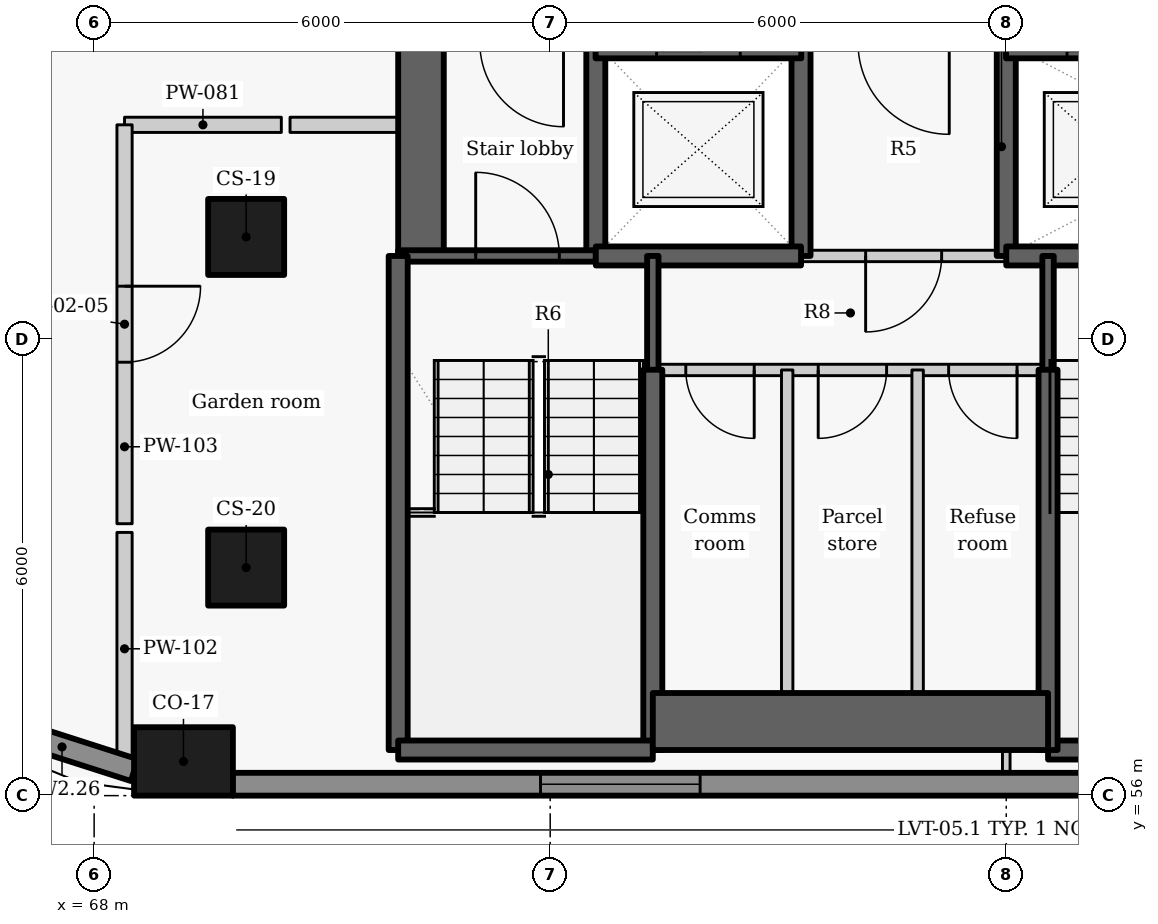
"""IFC4 building model, lengths in metres.
Left out: names, types, materials, properties, quantities, classifications, styles, units other than length and angle.
Written with IfcOpenShell. Run it as: python <this file> out.ifc"""

import sys

from ifc_helpers import new_model, si_unit, direction, frame, frame_2d, origin, origin_2d, place, context, subcontext, project, spatial, rectangle, extrude, element, fill, save


model = new_model("IFC4")
c1 = context("Model", 3, precision=1e-05, world=origin(), true_north=direction((0.0, 1.0)))
c2 = subcontext(c1, "Body", "Model", "MODEL_VIEW")
j1 = project(units=[si_unit("LENGTHUNIT", "METRE"), si_unit("PLANEANGLEUNIT", "RADIAN")], contexts=[c1])
p1 = place(None, origin())
s1 = spatial("IfcSite", under=j1, at=p1, CompositionType="ELEMENT")
p2 = place(p1, origin())
s2 = spatial("IfcBuilding", under=s1, at=p2, CompositionType="ELEMENT")
p3 = place(p2, frame((0.0, 0.0, 127.2)))
s3 = spatial("IfcBuildingStorey", under=s2, at=p3, CompositionType="ELEMENT", Elevation=127.2)
p4 = place(p3, frame((69.175, 56.45, 0.0), z_axis=(0.0, 0.0, 1.0), x_axis=(1.0, 0.0, 0.0)))
e1 = element("IfcColumn", 1, at=p4, inside=s3, PredefinedType="COLUMN", context=c2, shape_type="SweptSolid", body=[
    extrude(rectangle(XDim=1.3, YDim=0.9, at=origin_2d()), origin(), (0.0, 0.0, 1.0), 3.3),
])
for number, where, z_axis, x_axis in (
    (2, (70.0, 63.35, 0.0), (0.0, 0.0, 1.0), (0.0, -1.0, 0.0)),
    (3, (70.0, 59.0, 0.0), (0.0, 0.0, 1.0), (0.0, -1.0, 0.0)),
):
    element("IfcColumn", number, at=place(p3, frame(where, z_axis=z_axis, x_axis=x_axis)), inside=s3, PredefinedType="COLUMN", context=c2, shape_type="SweptSolid", body=[
        extrude(rectangle(XDim=1.0, YDim=1.0, at=origin_2d()), origin(), (0.0, 0.0, 1.0), 3.3),
    ])
p5 = place(p3, frame((66.626, 56.946, 0.0), z_axis=(0.0, 0.0, 1.0), x_axis=(0.952201240673, -0.305471434444, 0.0)))
e4 = element("IfcWall", 4, at=p5, inside=s3, PredefinedType="SOLIDWALL", context=c2, shape_type="SweptSolid", body=[
    extrude(rectangle(XDim=1.999, YDim=0.3, at=frame_2d((1.0, 0.0))), origin(), (0.0, 0.0, 1.0), 2.425),
])
p6 = place(p3, frame((69.821, 56.15, 0.0), z_axis=(0.0, 0.0, 1.0), x_axis=(1.0, 0.0, 0.0)))
e5 = element("IfcWall", 5, at=p6, inside=s3, PredefinedType="SOLIDWALL", context=c2, shape_type="SweptSolid", body=[
    extrude(rectangle(XDim=20.04, YDim=0.3, at=frame_2d((10.02, 0.0))), origin(), (0.0, 0.0, 1.0), 2.425),
])
p7 = place(p6, frame((4.051, 0.0, 0.9)))
e6 = element("IfcOpeningElement", 6, at=p7, cuts=e5, PredefinedType="OPENING", context=c2, shape_type="SweptSolid", body=[
    extrude(rectangle(XDim=2.1, YDim=1.1, at=frame_2d((1.05, 0.55))), frame((0.0, 0.16, 0.0), z_axis=(0.0, -1.0, 0.0), x_axis=(1.0, 0.0, 0.0)), (0.0, 0.0, 1.0), 0.32),
])
p8 = place(p6, frame((14.047, 0.0, 0.9)))
e7 = element("IfcOpeningElement", 7, at=p8, cuts=e5, PredefinedType="OPENING", context=c2, shape_type="SweptSolid", body=[
    extrude(rectangle(XDim=2.1, YDim=1.1, at=frame_2d((1.05, 0.55))), frame((0.0, 0.16, 0.0), z_axis=(0.0, -1.0, 0.0), x_axis=(1.0, 0.0, 0.0)), (0.0, 0.0, 1.0), 0.32),
])
p9 = place(p3, frame((74.6, 63.1, -0.41), z_axis=(0.0, 0.0, 1.0), x_axis=(0.0, 1.0, 0.0)))
e8 = element("IfcWall", 8, at=p9, inside=s3, PredefinedType="SHEAR", context=c2, shape_type="SweptSolid", body=[
    extrude(rectangle(XDim=2.8, YDim=0.25, at=frame_2d((1.4, 0.0))), origin(), (0.0, 0.0, 1.0), 3.435),
])
p10 = place(p3, frame((72.3, 63.1, -0.41), z_axis=(0.0, 0.0, 1.0), x_axis=(0.0, 1.0, 0.0)))
e9 = element("IfcWall", 9, at=p10, inside=s3, PredefinedType="SHEAR", context=c2, shape_type="SweptSolid", body=[
    extrude(rectangle(XDim=9.1, YDim=0.6, at=frame_2d((4.55, 0.0))), origin(), (0.0, 0.0, 1.0), 3.435),
])
p11 = place(p10, frame((3.748, 0.0, 0.41)))
e10 = element("IfcOpeningElement", 10, at=p11, cuts=e9, PredefinedType="OPENING", context=c2, shape_type="SweptSolid", body=[
    extrude(rectangle(XDim=1.5, YDim=2.1, at=frame_2d((0.75, 1.05))), frame((0.0, 0.31, 0.0), z_axis=(0.0, -1.0, 0.0), x_axis=(1.0, 0.0, 0.0)), (0.0, 0.0, 1.0), 0.62),
])
for number, where, z_axis, x_axis in (
    (11, (77.3, 63.1, -0.41), (0.0, 0.0, 1.0), (0.0, 1.0, 0.0)),
    (12, (80.0, 63.1, -0.41), (0.0, 0.0, 1.0), (0.0, 1.0, 0.0)),
):
    element("IfcWall", number, at=place(p3, frame(where, z_axis=z_axis, x_axis=x_axis)), inside=s3, PredefinedType="SHEAR", context=c2, shape_type="SweptSolid", body=[
        extrude(rectangle(XDim=2.8, YDim=0.25, at=frame_2d((1.4, 0.0))), origin(), (0.0, 0.0, 1.0), 3.435),
    ])
p12 = place(p3, frame((74.597, 65.9, -0.41), z_axis=(0.0, 0.0, 1.0), x_axis=(1.0, 0.0, 0.0)))
e13 = element("IfcWall", 13, at=p12, inside=s3, PredefinedType="SHEAR", context=c2, shape_type="SweptSolid", body=[
    extrude(rectangle(XDim=2.706, YDim=0.4, at=frame_2d((1.353, 0.0))), origin(), (0.0, 0.0, 1.0), 3.435),
])
p13 = place(p12, frame((0.803, 0.0, 0.41)))
e14 = element("IfcOpeningElement", 14, at=p13, cuts=e13, PredefinedType="OPENING", context=c2, shape_type="SweptSolid", body=[
    extrude(rectangle(XDim=1.1, YDim=2.1, at=frame_2d((0.55, 1.05))), frame((0.0, 0.21, 0.0), z_axis=(0.0, -1.0, 0.0), x_axis=(1.0, 0.0, 0.0)), (0.0, 0.0, 1.0), 0.42),
])
p14 = place(p3, frame((79.997, 65.9, -0.41), z_axis=(0.0, 0.0, 1.0), x_axis=(1.0, 0.0, 0.0)))
e15 = element("IfcWall", 15, at=p14, inside=s3, PredefinedType="SHEAR", context=c2, shape_type="SweptSolid", body=[
    extrude(rectangle(XDim=5.406, YDim=0.4, at=frame_2d((2.703, 0.0))), origin(), (0.0, 0.0, 1.0), 3.435),
])
p15 = place(p14, frame((0.803, 0.0, 0.41)))
e16 = element("IfcOpeningElement", 16, at=p15, cuts=e15, PredefinedType="OPENING", context=c2, shape_type="SweptSolid", body=[
    extrude(rectangle(XDim=1.1, YDim=2.1, at=frame_2d((0.55, 1.05))), frame((0.0, 0.21, 0.0), z_axis=(0.0, -1.0, 0.0), x_axis=(1.0, 0.0, 0.0)), (0.0, 0.0, 1.0), 0.42),
])
p16 = place(p3, frame((72.0, 63.1, -0.41), z_axis=(0.0, 0.0, 1.0), x_axis=(1.0, 0.0, 0.0)))
e17 = element("IfcWall", 17, at=p16, inside=s3, PredefinedType="SHEAR", context=c2, shape_type="SweptSolid", body=[
    extrude(rectangle(XDim=2.6, YDim=0.15, at=frame_2d((1.3, 0.0))), origin(), (0.0, 0.0, 1.0), 3.435),
])
p17 = place(p16, frame((1.02, 0.0, 0.41)))
e18 = element("IfcOpeningElement", 18, at=p17, cuts=e17, PredefinedType="OPENING", context=c2, shape_type="SweptSolid", body=[
    extrude(rectangle(XDim=1.1, YDim=2.1, at=frame_2d((0.55, 1.05))), frame((0.0, 0.085, 0.0), z_axis=(0.0, -1.0, 0.0), x_axis=(1.0, 0.0, 0.0)), (0.0, 0.0, 1.0), 0.17),
])
p18 = place(p3, frame((74.6, 63.1, -0.41), z_axis=(0.0, 0.0, 1.0), x_axis=(1.0, 0.0, 0.0)))
e19 = element("IfcWall", 19, at=p18, inside=s3, PredefinedType="SHEAR", context=c2, shape_type="SweptSolid", body=[
    extrude(rectangle(XDim=2.7, YDim=0.25, at=frame_2d((1.35, 0.0))), origin(), (0.0, 0.0, 1.0), 3.435),
])
p19 = place(p3, frame((80.0, 63.1, -0.41), z_axis=(0.0, 0.0, 1.0), x_axis=(1.0, 0.0, 0.0)))
e20 = element("IfcWall", 20, at=p19, inside=s3, PredefinedType="SHEAR", context=c2, shape_type="SweptSolid", body=[
    extrude(rectangle(XDim=8.0, YDim=0.25, at=frame_2d((4.0, 0.0))), origin(), (0.0, 0.0, 1.0), 3.435),
])
p20 = place(p19, frame((3.849, 0.0, 0.41)))
e21 = element("IfcOpeningElement", 21, at=p20, cuts=e20, PredefinedType="OPENING", context=c2, shape_type="SweptSolid", body=[
    extrude(rectangle(XDim=1.1, YDim=2.1, at=frame_2d((0.55, 1.05))), frame((0.0, 0.135, 0.0), z_axis=(0.0, -1.0, 0.0), x_axis=(1.0, 0.0, 0.0)), (0.0, 0.0, 1.0), 0.27),
])
p21 = place(p3, frame((80.0, 63.1, 0.0), z_axis=(0.0, 0.0, 1.0), x_axis=(-1.0, 0.0, 0.0)))
e22 = element("IfcWall", 22, at=p21, inside=s3, PredefinedType="PARTITIONING", context=c2, shape_type="SweptSolid", body=[
    extrude(rectangle(XDim=2.7, YDim=0.15, at=frame_2d((1.35, 0.0))), origin(), (0.0, 0.0, 1.0), 3.025),
])
p22 = place(p21, frame((0.85, 0.0, 0.0)))
e23 = element("IfcOpeningElement", 23, at=p22, cuts=e22, PredefinedType="OPENING", context=c2, shape_type="SweptSolid", body=[
    extrude(rectangle(XDim=1.0, YDim=2.1, at=frame_2d((0.5, 1.05))), frame((0.0, 0.085, 0.0), z_axis=(0.0, -1.0, 0.0), x_axis=(1.0, 0.0, 0.0)), (0.0, 0.0, 1.0), 0.17),
])
p23 = place(p3, frame((75.35, 61.597, -0.41), z_axis=(0.0, 0.0, 1.0), x_axis=(0.0, 1.0, 0.0)))
e24 = element("IfcWall", 24, at=p23, inside=s3, PredefinedType="SHEAR", context=c2, shape_type="SweptSolid", body=[
    extrude(rectangle(XDim=1.503, YDim=0.15, at=frame_2d((0.751, 0.0))), origin(), (0.0, 0.0, 1.0), 3.435),
])
p24 = place(p3, frame((75.35, 56.6, -0.41), z_axis=(0.0, 0.0, 1.0), x_axis=(0.0, 1.0, 0.0)))
e25 = element("IfcWall", 25, at=p24, inside=s3, PredefinedType="SHEAR", context=c2, shape_type="SweptSolid", body=[
    extrude(rectangle(XDim=5.003, YDim=0.25, at=frame_2d((2.501, 0.0))), origin(), (0.0, 0.0, 1.0), 3.435),
])
p25 = place(p3, frame((72.0, 56.6, -0.41), z_axis=(0.0, 0.0, 1.0), x_axis=(0.0, 1.0, 0.0)))
e26 = element("IfcWall", 26, at=p25, inside=s3, PredefinedType="SHEAR", context=c2, shape_type="SweptSolid", body=[
    extrude(rectangle(XDim=6.5, YDim=0.25, at=frame_2d((3.25, 0.0))), origin(), (0.0, 0.0, 1.0), 3.435),
])
p26 = place(p3, frame((72.0, 56.6, 0.0), z_axis=(0.0, 0.0, 1.0), x_axis=(1.0, 0.0, 0.0)))
e27 = element("IfcWall", 27, at=p26, inside=s3, PredefinedType="SHEAR", context=c2, shape_type="SweptSolid", body=[
    extrude(rectangle(XDim=3.35, YDim=0.25, at=frame_2d((1.675, 0.0))), origin(), (0.0, 0.0, 1.0), 3.025),
])
p27 = place(p3, frame((80.55, 56.6, 0.0), z_axis=(0.0, 0.0, 1.0), x_axis=(1.0, 0.0, 0.0)))
e28 = element("IfcWall", 28, at=p27, inside=s3, PredefinedType="SHEAR", context=c2, shape_type="SweptSolid", body=[
    extrude(rectangle(XDim=2.85, YDim=0.25, at=frame_2d((1.425, 0.0))), origin(), (0.0, 0.0, 1.0), 3.025),
])
p28 = place(p3, frame((80.55, 61.597, -0.41), z_axis=(0.0, 0.0, 1.0), x_axis=(0.0, 1.0, 0.0)))
e29 = element("IfcWall", 29, at=p28, inside=s3, PredefinedType="SHEAR", context=c2, shape_type="SweptSolid", body=[
    extrude(rectangle(XDim=1.503, YDim=0.15, at=frame_2d((0.751, 0.0))), origin(), (0.0, 0.0, 1.0), 3.435),
])
p29 = place(p3, frame((80.55, 56.6, -0.41), z_axis=(0.0, 0.0, 1.0), x_axis=(0.0, 1.0, 0.0)))
e30 = element("IfcWall", 30, at=p29, inside=s3, PredefinedType="SHEAR", context=c2, shape_type="SweptSolid", body=[
    extrude(rectangle(XDim=5.003, YDim=0.25, at=frame_2d((2.501, 0.0))), origin(), (0.0, 0.0, 1.0), 3.435),
])
p30 = place(p3, frame((75.35, 56.975, -0.41), z_axis=(0.0, 0.0, 1.0), x_axis=(1.0, 0.0, 0.0)))
e31 = element("IfcWall", 31, at=p30, inside=s3, PredefinedType="SHEAR", context=c2, shape_type="SweptSolid", body=[
    extrude(rectangle(XDim=5.2, YDim=0.75, at=frame_2d((2.6, 0.0))), origin(), (0.0, 0.0, 1.0), 3.435),
])
p31 = place(p3, frame((80.55, 61.6, 0.0), z_axis=(0.0, 0.0, 1.0), x_axis=(-1.0, 0.0, 0.0)))
e32 = element("IfcWall", 32, at=p31, inside=s3, PredefinedType="PARTITIONING", context=c2, shape_type="SweptSolid", body=[
    extrude(rectangle(XDim=5.2, YDim=0.15, at=frame_2d((2.6, 0.0))), origin(), (0.0, 0.0, 1.0), 3.025),
])
p32 = place(p31, frame((3.866, 0.0, 0.0)))
e33 = element("IfcOpeningElement", 33, at=p32, cuts=e32, PredefinedType="OPENING", context=c2, shape_type="SweptSolid", body=[
    extrude(rectangle(XDim=0.9, YDim=2.1, at=frame_2d((0.45, 1.05))), frame((0.0, 0.085, 0.0), z_axis=(0.0, -1.0, 0.0), x_axis=(1.0, 0.0, 0.0)), (0.0, 0.0, 1.0), 0.17),
])
p33 = place(p31, frame((2.124, 0.0, 0.0)))
e34 = element("IfcOpeningElement", 34, at=p33, cuts=e32, PredefinedType="OPENING", context=c2, shape_type="SweptSolid", body=[
    extrude(rectangle(XDim=0.9, YDim=2.1, at=frame_2d((0.45, 1.05))), frame((0.0, 0.085, 0.0), z_axis=(0.0, -1.0, 0.0), x_axis=(1.0, 0.0, 0.0)), (0.0, 0.0, 1.0), 0.17),
])
p34 = place(p31, frame((0.408, 0.0, 0.0)))
e35 = element("IfcOpeningElement", 35, at=p34, cuts=e32, PredefinedType="OPENING", context=c2, shape_type="SweptSolid", body=[
    extrude(rectangle(XDim=0.9, YDim=2.1, at=frame_2d((0.45, 1.05))), frame((0.0, 0.085, 0.0), z_axis=(0.0, -1.0, 0.0), x_axis=(1.0, 0.0, 0.0)), (0.0, 0.0, 1.0), 0.17),
])
for number, where, z_axis, x_axis in (
    (36, (77.118, 56.6, 0.0), (0.0, 0.0, 1.0), (0.0, 1.0, 0.0)),
    (37, (78.834, 56.6, 0.0), (0.0, 0.0, 1.0), (0.0, 1.0, 0.0)),
):
    element("IfcWall", number, at=place(p3, frame(where, z_axis=z_axis, x_axis=x_axis)), inside=s3, PredefinedType="PARTITIONING", context=c2, shape_type="SweptSolid", body=[
        extrude(rectangle(XDim=5.0, YDim=0.15, at=frame_2d((2.5, 0.0))), origin(), (0.0, 0.0, 1.0), 3.025),
    ])
p35 = place(p3, frame((68.4, 64.825, 0.0), z_axis=(0.0, 0.0, 1.0), x_axis=(1.0, 0.0, 0.0)))
e38 = element("IfcWall", 38, at=p35, inside=s3, PredefinedType="PARTITIONING", context=c2, shape_type="SweptSolid", body=[
    extrude(rectangle(XDim=2.063, YDim=0.2, at=frame_2d((1.031, 0.0))), origin(), (0.0, 0.0, 1.0), 2.505),
])
p36 = place(p3, frame((70.577, 64.825, 0.0), z_axis=(0.0, 0.0, 1.0), x_axis=(1.0, 0.0, 0.0)))
e39 = element("IfcWall", 39, at=p36, inside=s3, PredefinedType="PARTITIONING", context=c2, shape_type="SweptSolid", body=[
    extrude(rectangle(XDim=1.423, YDim=0.2, at=frame_2d((0.711, 0.0))), origin(), (0.0, 0.0, 1.0), 3.025),
])
p37 = place(p3, frame((68.4, 56.401, 0.0), z_axis=(0.0, 0.0, 1.0), x_axis=(0.0, 1.0, 0.0)))
e40 = element("IfcWall", 40, at=p37, inside=s3, PredefinedType="PARTITIONING", context=c2, shape_type="SweptSolid", body=[
    extrude(rectangle(XDim=3.062, YDim=0.2, at=frame_2d((1.531, 0.0))), origin(), (0.0, 0.0, 1.0), 2.405),
])
p38 = place(p3, frame((68.4, 64.825, 0.0), z_axis=(0.0, 0.0, 1.0), x_axis=(0.0, -1.0, 0.0)))
e41 = element("IfcWall", 41, at=p38, inside=s3, PredefinedType="PARTITIONING", context=c2, shape_type="SweptSolid", body=[
    extrude(rectangle(XDim=5.248, YDim=0.2, at=frame_2d((2.624, 0.0))), origin(), (0.0, 0.0, 1.0), 3.025),
])
p39 = place(p38, frame((2.123, 0.0, 0.0)))
e42 = element("IfcOpeningElement", 42, at=p39, cuts=e41, PredefinedType="OPENING", context=c2, shape_type="SweptSolid", body=[
    extrude(rectangle(XDim=1.0, YDim=2.1, at=frame_2d((0.5, 1.05))), frame((0.0, 0.11, 0.0), z_axis=(0.0, -1.0, 0.0), x_axis=(1.0, 0.0, 0.0)), (0.0, 0.0, 1.0), 0.22),
])
p40 = place(p3, frame((80.0, 56.3, 0.0), z_axis=(0.0, 0.0, 1.0), x_axis=(0.0, 1.0, 0.0)))
e43 = element("IfcWall", 43, at=p40, inside=s3, PredefinedType="PARTITIONING", context=c2, shape_type="SweptSolid", body=[
    extrude(rectangle(XDim=0.3, YDim=0.1, at=frame_2d((0.15, 0.0))), origin(), (0.0, 0.0, 1.0), 3.025),
])
p41 = place(p7, origin())
e44 = element("IfcWindow", 44, at=p41, inside=s3, PartitioningType="SINGLE_PANEL", PredefinedType="WINDOW", context=c2, shape_type="SweptSolid", body=[
    extrude(rectangle(XDim=2.1, YDim=1.1, at=frame_2d((1.05, 0.55))), frame((0.0, 0.03, 0.0), z_axis=(0.0, -1.0, 0.0), x_axis=(1.0, 0.0, 0.0)), (0.0, 0.0, 1.0), 0.06),
])
fill(e6, e44)
p42 = place(p22, origin())
e45 = element("IfcDoor", 45, at=p42, inside=s3, OperationType="SINGLE_SWING_RIGHT", PredefinedType="DOOR", context=c2, shape_type="SweptSolid", body=[
    extrude(rectangle(XDim=1.0, YDim=2.1, at=frame_2d((0.5, 1.05))), frame((0.0, 0.025, 0.0), z_axis=(0.0, -1.0, 0.0), x_axis=(1.0, 0.0, 0.0)), (0.0, 0.0, 1.0), 0.05),
])
fill(e23, e45)
p43 = place(p32, origin())
e46 = element("IfcDoor", 46, at=p43, inside=s3, OperationType="SINGLE_SWING_LEFT", PredefinedType="DOOR", context=c2, shape_type="SweptSolid", body=[
    extrude(rectangle(XDim=0.9, YDim=2.1, at=frame_2d((0.45, 1.05))), frame((0.0, 0.025, 0.0), z_axis=(0.0, -1.0, 0.0), x_axis=(1.0, 0.0, 0.0)), (0.0, 0.0, 1.0), 0.05),
])
fill(e33, e46)
p44 = place(p33, origin())
e47 = element("IfcDoor", 47, at=p44, inside=s3, OperationType="SINGLE_SWING_RIGHT", PredefinedType="DOOR", context=c2, shape_type="SweptSolid", body=[
    extrude(rectangle(XDim=0.9, YDim=2.1, at=frame_2d((0.45, 1.05))), frame((0.0, 0.025, 0.0), z_axis=(0.0, -1.0, 0.0), x_axis=(1.0, 0.0, 0.0)), (0.0, 0.0, 1.0), 0.05),
])
fill(e34, e47)
p45 = place(p34, origin())
e48 = element("IfcDoor", 48, at=p45, inside=s3, OperationType="SINGLE_SWING_LEFT", PredefinedType="DOOR", context=c2, shape_type="SweptSolid", body=[
    extrude(rectangle(XDim=0.9, YDim=2.1, at=frame_2d((0.45, 1.05))), frame((0.0, 0.025, 0.0), z_axis=(0.0, -1.0, 0.0), x_axis=(1.0, 0.0, 0.0)), (0.0, 0.0, 1.0), 0.05),
])
fill(e35, e48)
p46 = place(p17, origin())
e49 = element("IfcDoor", 49, at=p46, inside=s3, OperationType="SINGLE_SWING_LEFT", PredefinedType="DOOR", context=c2, shape_type="SweptSolid", body=[
    extrude(rectangle(XDim=1.1, YDim=2.1, at=frame_2d((0.55, 1.05))), frame((0.0, 0.025, 0.0), z_axis=(0.0, -1.0, 0.0), x_axis=(1.0, 0.0, 0.0)), (0.0, 0.0, 1.0), 0.05),
])
fill(e18, e49)
p47 = place(p39, origin())
e50 = element("IfcDoor", 50, at=p47, inside=s3, OperationType="SINGLE_SWING_LEFT", PredefinedType="DOOR", context=c2, shape_type="SweptSolid", body=[
    extrude(rectangle(XDim=1.0, YDim=2.1, at=frame_2d((0.5, 1.05))), frame((0.0, 0.025, 0.0), z_axis=(0.0, -1.0, 0.0), x_axis=(1.0, 0.0, 0.0)), (0.0, 0.0, 1.0), 0.05),
])
fill(e42, e50)
save(model, sys.argv[1])
